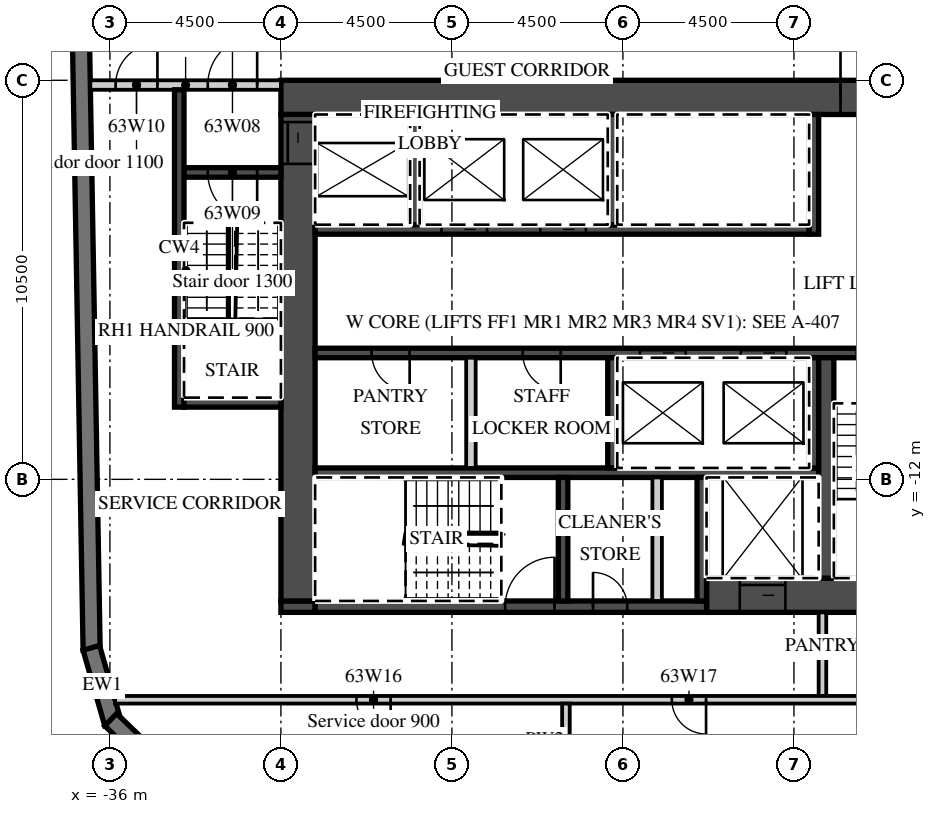
"""IFC4 building model, lengths in metres.
Left out: names, types, materials, properties, quantities, classifications, styles, units other than length and angle.
Written with IfcOpenShell. Run it as: python <this file> out.ifc"""

import sys

from ifc_helpers import new_model, si_unit, direction, frame, frame_2d, origin, place, context, subcontext, project, spatial, polyline, rectangle, outline, extrude, element, fill, save


model = new_model("IFC4")
c1 = context("Model", 3, precision=1e-05, world=origin(), true_north=direction((0.0, 1.0)))
c2 = subcontext(c1, "Body", "Model", "MODEL_VIEW")
j1 = project(units=[si_unit("LENGTHUNIT", "METRE"), si_unit("PLANEANGLEUNIT", "RADIAN")], contexts=[c1])
p1 = place(None, origin())
s1 = spatial("IfcSite", under=j1, at=p1, CompositionType="ELEMENT")
p2 = place(p1, origin())
s2 = spatial("IfcBuilding", under=s1, at=p2, CompositionType="ELEMENT")
p3 = place(p2, frame((0.0, 0.0, 254.0)))
s3 = spatial("IfcBuildingStorey", under=s2, at=p3, CompositionType="ELEMENT", Elevation=254.0)
p4 = place(p3, frame((-37.057, 16.503, 0.0), z_axis=(0.0, 0.0, 1.0), x_axis=(0.017452279857, -0.999847697366, 0.0)))
e1 = element("IfcWall", 1, at=p4, inside=s3, PredefinedType="SOLIDWALL", context=c2, shape_type="SweptSolid", body=[
    extrude(rectangle(XDim=33.0, YDim=0.45, at=frame_2d((16.5, 0.0))), origin(), (0.0, 0.0, 1.0), 3.0),
])
p5 = place(p3, frame((-36.49, -16.434, 0.0), z_axis=(0.0, 0.0, 1.0), x_axis=(0.275577603096, -0.961278827745, 0.0)))
e2 = element("IfcWall", 2, at=p5, inside=s3, PredefinedType="SOLIDWALL", context=c2, shape_type="SweptSolid", body=[
    extrude(outline(polyline([(0.0, -0.225), (2.071, -0.225), (1.95, 0.225), (0.121, 0.225), (0.0, -0.225)])), origin(), (0.0, 0.0, 1.0), 3.0),
])
p6 = place(p3, frame((-35.979, -18.324, 0.0), z_axis=(0.0, 0.0, 1.0), x_axis=(0.719320193998, -0.694678672846, 0.0)))
e3 = element("IfcWall", 3, at=p6, inside=s3, PredefinedType="SOLIDWALL", context=c2, shape_type="SweptSolid", body=[
    extrude(outline(polyline([(0.0, -0.225), (2.071, -0.225), (1.95, 0.225), (0.121, 0.225), (0.0, -0.225)])), origin(), (0.0, 0.0, 1.0), 3.0),
])
p7 = place(p3, frame((-31.5, -1.95, 0.0), z_axis=(0.0, 0.0, 1.0), x_axis=(1.0, 0.0, 0.0)))
e4 = element("IfcWall", 4, at=p7, inside=s3, PredefinedType="SHEAR", context=c2, shape_type="SweptSolid", body=[
    extrude(rectangle(XDim=18.0, YDim=0.9, at=frame_2d((9.0, 0.0))), origin(), (0.0, 0.0, 1.0), 3.0),
])
p8 = place(p7, frame((14.725, 0.0, 0.0)))
e5 = element("IfcOpeningElement", 5, at=p8, cuts=e4, PredefinedType="OPENING", context=c2, shape_type="SweptSolid", body=[
    extrude(rectangle(XDim=1.8, YDim=2.1, at=frame_2d((0.9, 1.05))), frame((0.0, 0.46, 0.0), z_axis=(0.0, -1.0, 0.0), x_axis=(1.0, 0.0, 0.0)), (0.0, 0.0, 1.0), 0.92),
])
p9 = place(p3, frame((-20.3, -15.05, 0.0), z_axis=(0.0, 0.0, 1.0), x_axis=(1.0, 0.0, 0.0)))
e6 = element("IfcWall", 6, at=p9, inside=s3, PredefinedType="SHEAR", context=c2, shape_type="SweptSolid", body=[
    extrude(rectangle(XDim=6.8, YDim=0.9, at=frame_2d((3.4, 0.0))), origin(), (0.0, 0.0, 1.0), 3.0),
])
p10 = place(p9, frame((0.875, 0.0, 0.0)))
e7 = element("IfcOpeningElement", 7, at=p10, cuts=e6, PredefinedType="OPENING", context=c2, shape_type="SweptSolid", body=[
    extrude(rectangle(XDim=1.2, YDim=2.1, at=frame_2d((0.6, 1.05))), frame((0.0, 0.46, 0.0), z_axis=(0.0, -1.0, 0.0), x_axis=(1.0, 0.0, 0.0)), (0.0, 0.0, 1.0), 0.92),
])
p11 = place(p3, frame((-31.5, -15.35, 0.0), z_axis=(0.0, 0.0, 1.0), x_axis=(1.0, 0.0, 0.0)))
e8 = element("IfcWall", 8, at=p11, inside=s3, PredefinedType="SHEAR", context=c2, shape_type="SweptSolid", body=[
    extrude(rectangle(XDim=0.9, YDim=0.3, at=frame_2d((0.45, 0.0))), origin(), (0.0, 0.0, 1.0), 3.0),
])
p12 = place(p3, frame((-30.6, -15.35, 0.0), z_axis=(0.0, 0.0, 1.0), x_axis=(1.0, 0.0, 0.0)))
e9 = element("IfcWall", 9, at=p12, inside=s3, PredefinedType="SHEAR", context=c2, shape_type="SweptSolid", body=[
    extrude(rectangle(XDim=10.3, YDim=0.3, at=frame_2d((5.15, 0.0))), origin(), (0.0, 0.0, 1.0), 3.0),
])
p13 = place(p12, frame((5.0, 0.0, 0.0)))
e10 = element("IfcOpeningElement", 10, at=p13, cuts=e9, PredefinedType="OPENING", context=c2, shape_type="SweptSolid", body=[
    extrude(rectangle(XDim=1.3, YDim=2.1, at=frame_2d((0.65, 1.05))), frame((0.0, 0.16, 0.0), z_axis=(0.0, -1.0, 0.0), x_axis=(1.0, 0.0, 0.0)), (0.0, 0.0, 1.0), 0.32),
])
p14 = place(p12, frame((7.312, 0.0, 0.0)))
e11 = element("IfcOpeningElement", 11, at=p14, cuts=e9, PredefinedType="OPENING", context=c2, shape_type="SweptSolid", body=[
    extrude(rectangle(XDim=0.9, YDim=2.1, at=frame_2d((0.45, 1.05))), frame((0.0, 0.16, 0.0), z_axis=(0.0, -1.0, 0.0), x_axis=(1.0, 0.0, 0.0)), (0.0, 0.0, 1.0), 0.32),
])
p15 = place(p3, frame((-31.05, -15.2, 0.0), z_axis=(0.0, 0.0, 1.0), x_axis=(0.0, 1.0, 0.0)))
e12 = element("IfcWall", 12, at=p15, inside=s3, PredefinedType="SHEAR", context=c2, shape_type="SweptSolid", body=[
    extrude(rectangle(XDim=12.8, YDim=0.9, at=frame_2d((6.4, 0.0))), origin(), (0.0, 0.0, 1.0), 3.0),
])
p16 = place(p15, frame((11.5, 0.0, 0.0)))
e13 = element("IfcOpeningElement", 13, at=p16, cuts=e12, PredefinedType="OPENING", context=c2, shape_type="SweptSolid", body=[
    extrude(rectangle(XDim=1.1, YDim=2.1, at=frame_2d((0.55, 1.05))), frame((0.0, 0.46, 0.0), z_axis=(0.0, -1.0, 0.0), x_axis=(1.0, 0.0, 0.0)), (0.0, 0.0, 1.0), 0.92),
])
p17 = place(p3, frame((-30.6, -5.425, 0.0), z_axis=(0.0, 0.0, 1.0), x_axis=(1.0, 0.0, 0.0)))
e14 = element("IfcWall", 14, at=p17, inside=s3, PredefinedType="SHEAR", context=c2, shape_type="SweptSolid", body=[
    extrude(rectangle(XDim=13.0, YDim=0.25, at=frame_2d((6.5, 0.0))), origin(), (0.0, 0.0, 1.0), 3.0),
])
p18 = place(p17, frame((3.325, 0.0, 0.0)))
e15 = element("IfcOpeningElement", 15, at=p18, cuts=e14, PredefinedType="OPENING", context=c2, shape_type="SweptSolid", body=[
    extrude(rectangle(XDim=1.2, YDim=2.1, at=frame_2d((0.6, 1.05))), frame((0.0, 0.135, 0.0), z_axis=(0.0, -1.0, 0.0), x_axis=(1.0, 0.0, 0.0)), (0.0, 0.0, 1.0), 0.27),
])
p19 = place(p17, frame((5.925, 0.0, 0.0)))
e16 = element("IfcOpeningElement", 16, at=p19, cuts=e14, PredefinedType="OPENING", context=c2, shape_type="SweptSolid", body=[
    extrude(rectangle(XDim=1.2, YDim=2.1, at=frame_2d((0.6, 1.05))), frame((0.0, 0.135, 0.0), z_axis=(0.0, -1.0, 0.0), x_axis=(1.0, 0.0, 0.0)), (0.0, 0.0, 1.0), 0.27),
])
p20 = place(p3, frame((-17.475, -5.55, 0.0), z_axis=(0.0, 0.0, 1.0), x_axis=(0.0, 1.0, 0.0)))
e17 = element("IfcWall", 17, at=p20, inside=s3, PredefinedType="SHEAR", context=c2, shape_type="SweptSolid", body=[
    extrude(rectangle(XDim=3.15, YDim=0.25, at=frame_2d((1.575, 0.0))), origin(), (0.0, 0.0, 1.0), 3.0),
])
for number, where, z_axis, x_axis in (
    (18, (-27.975, -5.3, 0.0), (0.0, 0.0, 1.0), (0.0, 1.0, 0.0)),
    (19, (-22.775, -5.3, 0.0), (0.0, 0.0, 1.0), (0.0, 1.0, 0.0)),
):
    element("IfcWall", number, at=place(p3, frame(where, z_axis=z_axis, x_axis=x_axis)), inside=s3, PredefinedType="SHEAR", context=c2, shape_type="SweptSolid", body=[
        extrude(rectangle(XDim=2.9, YDim=0.25, at=frame_2d((1.45, 0.0))), origin(), (0.0, 0.0, 1.0), 3.0),
    ])
p21 = place(p3, frame((-30.6, -8.675, 0.0), z_axis=(0.0, 0.0, 1.0), x_axis=(1.0, 0.0, 0.0)))
e20 = element("IfcWall", 20, at=p21, inside=s3, PredefinedType="SHEAR", context=c2, shape_type="SweptSolid", body=[
    extrude(rectangle(XDim=16.2, YDim=0.25, at=frame_2d((8.1, 0.0))), origin(), (0.0, 0.0, 1.0), 3.0),
])
p22 = place(p21, frame((8.55, 0.0, 0.0)))
e21 = element("IfcOpeningElement", 21, at=p22, cuts=e20, PredefinedType="OPENING", context=c2, shape_type="SweptSolid", body=[
    extrude(rectangle(XDim=1.2, YDim=2.1, at=frame_2d((0.6, 1.05))), frame((0.0, 0.135, 0.0), z_axis=(0.0, -1.0, 0.0), x_axis=(1.0, 0.0, 0.0)), (0.0, 0.0, 1.0), 0.27),
])
p23 = place(p21, frame((11.2, 0.0, 0.0)))
e22 = element("IfcOpeningElement", 22, at=p23, cuts=e20, PredefinedType="OPENING", context=c2, shape_type="SweptSolid", body=[
    extrude(rectangle(XDim=1.2, YDim=2.1, at=frame_2d((0.6, 1.05))), frame((0.0, 0.135, 0.0), z_axis=(0.0, -1.0, 0.0), x_axis=(1.0, 0.0, 0.0)), (0.0, 0.0, 1.0), 0.27),
])
p24 = place(p21, frame((14.25, 0.0, 0.0)))
e23 = element("IfcOpeningElement", 23, at=p24, cuts=e20, PredefinedType="OPENING", context=c2, shape_type="SweptSolid", body=[
    extrude(rectangle(XDim=1.3, YDim=2.1, at=frame_2d((0.65, 1.05))), frame((0.0, 0.135, 0.0), z_axis=(0.0, -1.0, 0.0), x_axis=(1.0, 0.0, 0.0)), (0.0, 0.0, 1.0), 0.27),
])
p25 = place(p21, frame((1.488, 0.0, 0.0)))
e24 = element("IfcOpeningElement", 24, at=p25, cuts=e20, PredefinedType="OPENING", context=c2, shape_type="SweptSolid", body=[
    extrude(rectangle(XDim=1.0, YDim=2.1, at=frame_2d((0.5, 1.05))), frame((0.0, 0.135, 0.0), z_axis=(0.0, -1.0, 0.0), x_axis=(1.0, 0.0, 0.0)), (0.0, 0.0, 1.0), 0.27),
])
p26 = place(p21, frame((5.462, 0.0, 0.0)))
e25 = element("IfcOpeningElement", 25, at=p26, cuts=e20, PredefinedType="OPENING", context=c2, shape_type="SweptSolid", body=[
    extrude(rectangle(XDim=1.0, YDim=2.1, at=frame_2d((0.5, 1.05))), frame((0.0, 0.135, 0.0), z_axis=(0.0, -1.0, 0.0), x_axis=(1.0, 0.0, 0.0)), (0.0, 0.0, 1.0), 0.27),
])
p27 = place(p3, frame((-30.6, -11.825, 0.0), z_axis=(0.0, 0.0, 1.0), x_axis=(1.0, 0.0, 0.0)))
e26 = element("IfcWall", 26, at=p27, inside=s3, PredefinedType="SHEAR", context=c2, shape_type="SweptSolid", body=[
    extrude(rectangle(XDim=13.25, YDim=0.25, at=frame_2d((6.625, 0.0))), origin(), (0.0, 0.0, 1.0), 3.0),
])
for number, where, z_axis, x_axis in (
    (27, (-17.475, -11.7, 0.0), (0.0, 0.0, 1.0), (0.0, 1.0, 0.0)),
    (28, (-22.775, -11.7, 0.0), (0.0, 0.0, 1.0), (0.0, 1.0, 0.0)),
):
    element("IfcWall", number, at=place(p3, frame(where, z_axis=z_axis, x_axis=x_axis)), inside=s3, PredefinedType="SHEAR", context=c2, shape_type="SweptSolid", body=[
        extrude(rectangle(XDim=2.9, YDim=0.25, at=frame_2d((1.45, 0.0))), origin(), (0.0, 0.0, 1.0), 3.0),
    ])
p28 = place(p3, frame((-26.5, -11.7, 0.0), z_axis=(0.0, 0.0, 1.0), x_axis=(0.0, 1.0, 0.0)))
e29 = element("IfcWall", 29, at=p28, inside=s3, PredefinedType="PARTITIONING", context=c2, shape_type="SweptSolid", body=[
    extrude(rectangle(XDim=2.9, YDim=0.25, at=frame_2d((1.45, 0.0))), origin(), (0.0, 0.0, 1.0), 3.0),
])
p29 = place(p3, frame((-17.15, -14.6, 0.0), z_axis=(0.0, 0.0, 1.0), x_axis=(0.0, 1.0, 0.0)))
e30 = element("IfcWall", 30, at=p29, inside=s3, PredefinedType="SHEAR", context=c2, shape_type="SweptSolid", body=[
    extrude(rectangle(XDim=5.8, YDim=0.4, at=frame_2d((2.9, 0.0))), origin(), (0.0, 0.0, 1.0), 3.0),
])
for number, where, z_axis, x_axis in (
    (31, (-20.425, -15.2, 0.0), (0.0, 0.0, 1.0), (0.0, 1.0, 0.0)),
    (32, (-24.075, -15.2, 0.0), (0.0, 0.0, 1.0), (0.0, 1.0, 0.0)),
):
    element("IfcWall", number, at=place(p3, frame(where, z_axis=z_axis, x_axis=x_axis)), inside=s3, PredefinedType="SHEAR", context=c2, shape_type="SweptSolid", body=[
        extrude(rectangle(XDim=3.25, YDim=0.25, at=frame_2d((1.625, 0.0))), origin(), (0.0, 0.0, 1.0), 3.0),
    ])
p30 = place(p3, frame((-21.6, -15.2, 0.0), z_axis=(0.0, 0.0, 1.0), x_axis=(0.0, 1.0, 0.0)))
e33 = element("IfcWall", 33, at=p30, inside=s3, PredefinedType="PARTITIONING", context=c2, shape_type="SweptSolid", body=[
    extrude(rectangle(XDim=3.25, YDim=0.25, at=frame_2d((1.625, 0.0))), origin(), (0.0, 0.0, 1.0), 3.0),
])
p31 = place(p3, frame((-36.515, -1.625, 0.0), z_axis=(0.0, 0.0, 1.0), x_axis=(1.0, 0.0, 0.0)))
e34 = element("IfcWall", 34, at=p31, inside=s3, PredefinedType="PARTITIONING", context=c2, shape_type="SweptSolid", body=[
    extrude(rectangle(XDim=5.015, YDim=0.25, at=frame_2d((2.508, 0.0))), origin(), (0.0, 0.0, 1.0), 3.0),
])
p32 = place(p31, frame((3.09, 0.0, 0.0)))
e35 = element("IfcOpeningElement", 35, at=p32, cuts=e34, PredefinedType="OPENING", context=c2, shape_type="SweptSolid", body=[
    extrude(rectangle(XDim=1.3, YDim=2.1, at=frame_2d((0.65, 1.05))), frame((0.0, 0.135, 0.0), z_axis=(0.0, -1.0, 0.0), x_axis=(1.0, 0.0, 0.0)), (0.0, 0.0, 1.0), 0.27),
])
p33 = place(p31, frame((0.665, 0.0, 0.0)))
e36 = element("IfcOpeningElement", 36, at=p33, cuts=e34, PredefinedType="OPENING", context=c2, shape_type="SweptSolid", body=[
    extrude(rectangle(XDim=1.1, YDim=2.1, at=frame_2d((0.55, 1.05))), frame((0.0, 0.135, 0.0), z_axis=(0.0, -1.0, 0.0), x_axis=(1.0, 0.0, 0.0)), (0.0, 0.0, 1.0), 0.27),
])
p34 = place(p3, frame((-34.05, -3.925, 0.0), z_axis=(0.0, 0.0, 1.0), x_axis=(1.0, 0.0, 0.0)))
e37 = element("IfcWall", 37, at=p34, inside=s3, PredefinedType="SHEAR", context=c2, shape_type="SweptSolid", body=[
    extrude(rectangle(XDim=2.55, YDim=0.25, at=frame_2d((1.275, 0.0))), origin(), (0.0, 0.0, 1.0), 3.0),
])
p35 = place(p34, frame((0.625, 0.0, 0.0)))
e38 = element("IfcOpeningElement", 38, at=p35, cuts=e37, PredefinedType="OPENING", context=c2, shape_type="SweptSolid", body=[
    extrude(rectangle(XDim=1.3, YDim=2.1, at=frame_2d((0.65, 1.05))), frame((0.0, 0.135, 0.0), z_axis=(0.0, -1.0, 0.0), x_axis=(1.0, 0.0, 0.0)), (0.0, 0.0, 1.0), 0.27),
])
p36 = place(p3, frame((-34.175, -10.1, 0.0), z_axis=(0.0, 0.0, 1.0), x_axis=(0.0, 1.0, 0.0)))
e39 = element("IfcWall", 39, at=p36, inside=s3, PredefinedType="SHEAR", context=c2, shape_type="SweptSolid", body=[
    extrude(rectangle(XDim=8.35, YDim=0.25, at=frame_2d((4.175, 0.0))), origin(), (0.0, 0.0, 1.0), 3.0),
])
p37 = place(p3, frame((-34.05, -9.975, 0.0), z_axis=(0.0, 0.0, 1.0), x_axis=(1.0, 0.0, 0.0)))
e40 = element("IfcWall", 40, at=p37, inside=s3, PredefinedType="SHEAR", context=c2, shape_type="SweptSolid", body=[
    extrude(rectangle(XDim=2.55, YDim=0.25, at=frame_2d((1.275, 0.0))), origin(), (0.0, 0.0, 1.0), 3.0),
])
p38 = place(p3, frame((-17.25, -17.7, 0.0), z_axis=(0.0, 0.0, 1.0), x_axis=(0.0, 1.0, 0.0)))
e41 = element("IfcWall", 41, at=p38, inside=s3, PredefinedType="PARTITIONING", context=c2, shape_type="SweptSolid", body=[
    extrude(rectangle(XDim=2.2, YDim=0.2, at=frame_2d((1.1, 0.0))), origin(), (0.0, 0.0, 1.0), 3.0),
])
p39 = place(p3, frame((-35.864, -17.8, 0.0), z_axis=(0.0, 0.0, 1.0), x_axis=(1.0, 0.0, 0.0)))
e42 = element("IfcWall", 42, at=p39, inside=s3, PredefinedType="PARTITIONING", context=c2, shape_type="SweptSolid", body=[
    extrude(rectangle(XDim=22.264, YDim=0.2, at=frame_2d((11.132, 0.0))), origin(), (0.0, 0.0, 1.0), 3.0),
])
p40 = place(p39, frame((6.351, 0.0, 0.0)))
e43 = element("IfcOpeningElement", 43, at=p40, cuts=e42, PredefinedType="OPENING", context=c2, shape_type="SweptSolid", body=[
    extrude(rectangle(XDim=0.9, YDim=2.1, at=frame_2d((0.45, 1.05))), frame((0.0, 0.11, 0.0), z_axis=(0.0, -1.0, 0.0), x_axis=(1.0, 0.0, 0.0)), (0.0, 0.0, 1.0), 0.22),
])
p41 = place(p39, frame((14.651, 0.0, 0.0)))
e44 = element("IfcOpeningElement", 44, at=p41, cuts=e42, PredefinedType="OPENING", context=c2, shape_type="SweptSolid", body=[
    extrude(rectangle(XDim=0.9, YDim=2.1, at=frame_2d((0.45, 1.05))), frame((0.0, 0.11, 0.0), z_axis=(0.0, -1.0, 0.0), x_axis=(1.0, 0.0, 0.0)), (0.0, 0.0, 1.0), 0.22),
])
p42 = place(p3, frame((-24.0, -19.824, 0.0), z_axis=(0.0, 0.0, 1.0), x_axis=(0.0, 1.0, 0.0)))
e45 = element("IfcWall", 45, at=p42, inside=s3, PredefinedType="PARTITIONING", context=c2, shape_type="SweptSolid", body=[
    extrude(rectangle(XDim=1.925, YDim=0.2, at=frame_2d((0.962, 0.0))), origin(), (0.0, 0.0, 1.0), 3.0),
])
p43 = place(p22, origin())
e46 = element("IfcDoor", 46, at=p43, inside=s3, OperationType="SLIDING_TO_LEFT", PredefinedType="DOOR", context=c2, shape_type="SweptSolid", body=[
    extrude(rectangle(XDim=1.2, YDim=2.1, at=frame_2d((0.6, 1.05))), frame((0.0, 0.025, 0.0), z_axis=(0.0, -1.0, 0.0), x_axis=(1.0, 0.0, 0.0)), (0.0, 0.0, 1.0), 0.05),
])
fill(e21, e46)
p44 = place(p23, origin())
e47 = element("IfcDoor", 47, at=p44, inside=s3, OperationType="SLIDING_TO_RIGHT", PredefinedType="DOOR", context=c2, shape_type="SweptSolid", body=[
    extrude(rectangle(XDim=1.2, YDim=2.1, at=frame_2d((0.6, 1.05))), frame((0.0, 0.025, 0.0), z_axis=(0.0, -1.0, 0.0), x_axis=(1.0, 0.0, 0.0)), (0.0, 0.0, 1.0), 0.05),
])
fill(e22, e47)
p45 = place(p18, origin())
e48 = element("IfcDoor", 48, at=p45, inside=s3, OperationType="SLIDING_TO_RIGHT", PredefinedType="DOOR", context=c2, shape_type="SweptSolid", body=[
    extrude(rectangle(XDim=1.2, YDim=2.1, at=frame_2d((0.6, 1.05))), frame((0.0, 0.025, 0.0), z_axis=(0.0, -1.0, 0.0), x_axis=(1.0, 0.0, 0.0)), (0.0, 0.0, 1.0), 0.05),
])
fill(e15, e48)
p46 = place(p19, origin())
e49 = element("IfcDoor", 49, at=p46, inside=s3, OperationType="SLIDING_TO_RIGHT", PredefinedType="DOOR", context=c2, shape_type="SweptSolid", body=[
    extrude(rectangle(XDim=1.2, YDim=2.1, at=frame_2d((0.6, 1.05))), frame((0.0, 0.025, 0.0), z_axis=(0.0, -1.0, 0.0), x_axis=(1.0, 0.0, 0.0)), (0.0, 0.0, 1.0), 0.05),
])
fill(e16, e49)
p47 = place(p10, origin())
e50 = element("IfcDoor", 50, at=p47, inside=s3, OperationType="SLIDING_TO_LEFT", PredefinedType="DOOR", context=c2, shape_type="SweptSolid", body=[
    extrude(rectangle(XDim=1.2, YDim=2.1, at=frame_2d((0.6, 1.05))), frame((0.0, 0.025, 0.0), z_axis=(0.0, -1.0, 0.0), x_axis=(1.0, 0.0, 0.0)), (0.0, 0.0, 1.0), 0.05),
])
fill(e7, e50)
p48 = place(p16, origin())
e51 = element("IfcDoor", 51, at=p48, inside=s3, OperationType="SLIDING_TO_RIGHT", PredefinedType="DOOR", context=c2, shape_type="SweptSolid", body=[
    extrude(rectangle(XDim=1.1, YDim=2.1, at=frame_2d((0.55, 1.05))), frame((0.0, 0.025, 0.0), z_axis=(0.0, -1.0, 0.0), x_axis=(1.0, 0.0, 0.0)), (0.0, 0.0, 1.0), 0.05),
])
fill(e13, e51)
p49 = place(p8, origin())
e52 = element("IfcDoor", 52, at=p49, inside=s3, OperationType="DOUBLE_DOOR_DOUBLE_SWING", PredefinedType="DOOR", context=c2, shape_type="SweptSolid", body=[
    extrude(rectangle(XDim=1.8, YDim=2.1, at=frame_2d((0.9, 1.05))), frame((0.0, 0.025, 0.0), z_axis=(0.0, -1.0, 0.0), x_axis=(1.0, 0.0, 0.0)), (0.0, 0.0, 1.0), 0.05),
])
fill(e5, e52)
p50 = place(p32, origin())
e53 = element("IfcDoor", 53, at=p50, inside=s3, OperationType="SINGLE_SWING_RIGHT", PredefinedType="DOOR", context=c2, shape_type="SweptSolid", body=[
    extrude(rectangle(XDim=1.3, YDim=2.1, at=frame_2d((0.65, 1.05))), frame((0.0, 0.025, 0.0), z_axis=(0.0, -1.0, 0.0), x_axis=(1.0, 0.0, 0.0)), (0.0, 0.0, 1.0), 0.05),
])
fill(e35, e53)
p51 = place(p35, origin())
e54 = element("IfcDoor", 54, at=p51, inside=s3, OperationType="SINGLE_SWING_RIGHT", PredefinedType="DOOR", context=c2, shape_type="SweptSolid", body=[
    extrude(rectangle(XDim=1.3, YDim=2.1, at=frame_2d((0.65, 1.05))), frame((0.0, 0.025, 0.0), z_axis=(0.0, -1.0, 0.0), x_axis=(1.0, 0.0, 0.0)), (0.0, 0.0, 1.0), 0.05),
])
fill(e38, e54)
p52 = place(p33, origin())
e55 = element("IfcDoor", 55, at=p52, inside=s3, OperationType="SINGLE_SWING_RIGHT", PredefinedType="DOOR", context=c2, shape_type="SweptSolid", body=[
    extrude(rectangle(XDim=1.1, YDim=2.1, at=frame_2d((0.55, 1.05))), frame((0.0, 0.025, 0.0), z_axis=(0.0, -1.0, 0.0), x_axis=(1.0, 0.0, 0.0)), (0.0, 0.0, 1.0), 0.05),
])
fill(e36, e55)
p53 = place(p24, origin())
e56 = element("IfcDoor", 56, at=p53, inside=s3, OperationType="SINGLE_SWING_RIGHT", PredefinedType="DOOR", context=c2, shape_type="SweptSolid", body=[
    extrude(rectangle(XDim=1.3, YDim=2.1, at=frame_2d((0.65, 1.05))), frame((0.0, 0.025, 0.0), z_axis=(0.0, -1.0, 0.0), x_axis=(1.0, 0.0, 0.0)), (0.0, 0.0, 1.0), 0.05),
])
fill(e23, e56)
p54 = place(p13, origin())
e57 = element("IfcDoor", 57, at=p54, inside=s3, OperationType="SINGLE_SWING_RIGHT", PredefinedType="DOOR", context=c2, shape_type="SweptSolid", body=[
    extrude(rectangle(XDim=1.3, YDim=2.1, at=frame_2d((0.65, 1.05))), frame((0.0, 0.025, 0.0), z_axis=(0.0, -1.0, 0.0), x_axis=(1.0, 0.0, 0.0)), (0.0, 0.0, 1.0), 0.05),
])
fill(e10, e57)
p55 = place(p14, origin())
e58 = element("IfcDoor", 58, at=p55, inside=s3, OperationType="SINGLE_SWING_LEFT", PredefinedType="DOOR", context=c2, shape_type="SweptSolid", body=[
    extrude(rectangle(XDim=0.9, YDim=2.1, at=frame_2d((0.45, 1.05))), frame((0.0, 0.025, 0.0), z_axis=(0.0, -1.0, 0.0), x_axis=(1.0, 0.0, 0.0)), (0.0, 0.0, 1.0), 0.05),
])
fill(e11, e58)
p56 = place(p25, origin())
e59 = element("IfcDoor", 59, at=p56, inside=s3, OperationType="SINGLE_SWING_RIGHT", PredefinedType="DOOR", context=c2, shape_type="SweptSolid", body=[
    extrude(rectangle(XDim=1.0, YDim=2.1, at=frame_2d((0.5, 1.05))), frame((0.0, 0.025, 0.0), z_axis=(0.0, -1.0, 0.0), x_axis=(1.0, 0.0, 0.0)), (0.0, 0.0, 1.0), 0.05),
])
fill(e24, e59)
p57 = place(p26, origin())
e60 = element("IfcDoor", 60, at=p57, inside=s3, OperationType="SINGLE_SWING_RIGHT", PredefinedType="DOOR", context=c2, shape_type="SweptSolid", body=[
    extrude(rectangle(XDim=1.0, YDim=2.1, at=frame_2d((0.5, 1.05))), frame((0.0, 0.025, 0.0), z_axis=(0.0, -1.0, 0.0), x_axis=(1.0, 0.0, 0.0)), (0.0, 0.0, 1.0), 0.05),
])
fill(e25, e60)
p58 = place(p40, origin())
e61 = element("IfcDoor", 61, at=p58, inside=s3, OperationType="SINGLE_SWING_RIGHT", PredefinedType="DOOR", context=c2, shape_type="SweptSolid", body=[
    extrude(rectangle(XDim=0.9, YDim=2.1, at=frame_2d((0.45, 1.05))), frame((0.0, 0.025, 0.0), z_axis=(0.0, -1.0, 0.0), x_axis=(1.0, 0.0, 0.0)), (0.0, 0.0, 1.0), 0.05),
])
fill(e43, e61)
p59 = place(p41, origin())
e62 = element("IfcDoor", 62, at=p59, inside=s3, OperationType="SINGLE_SWING_RIGHT", PredefinedType="DOOR", context=c2, shape_type="SweptSolid", body=[
    extrude(rectangle(XDim=0.9, YDim=2.1, at=frame_2d((0.45, 1.05))), frame((0.0, 0.025, 0.0), z_axis=(0.0, -1.0, 0.0), x_axis=(1.0, 0.0, 0.0)), (0.0, 0.0, 1.0), 0.05),
])
fill(e44, e62)
save(model, sys.argv[1])
